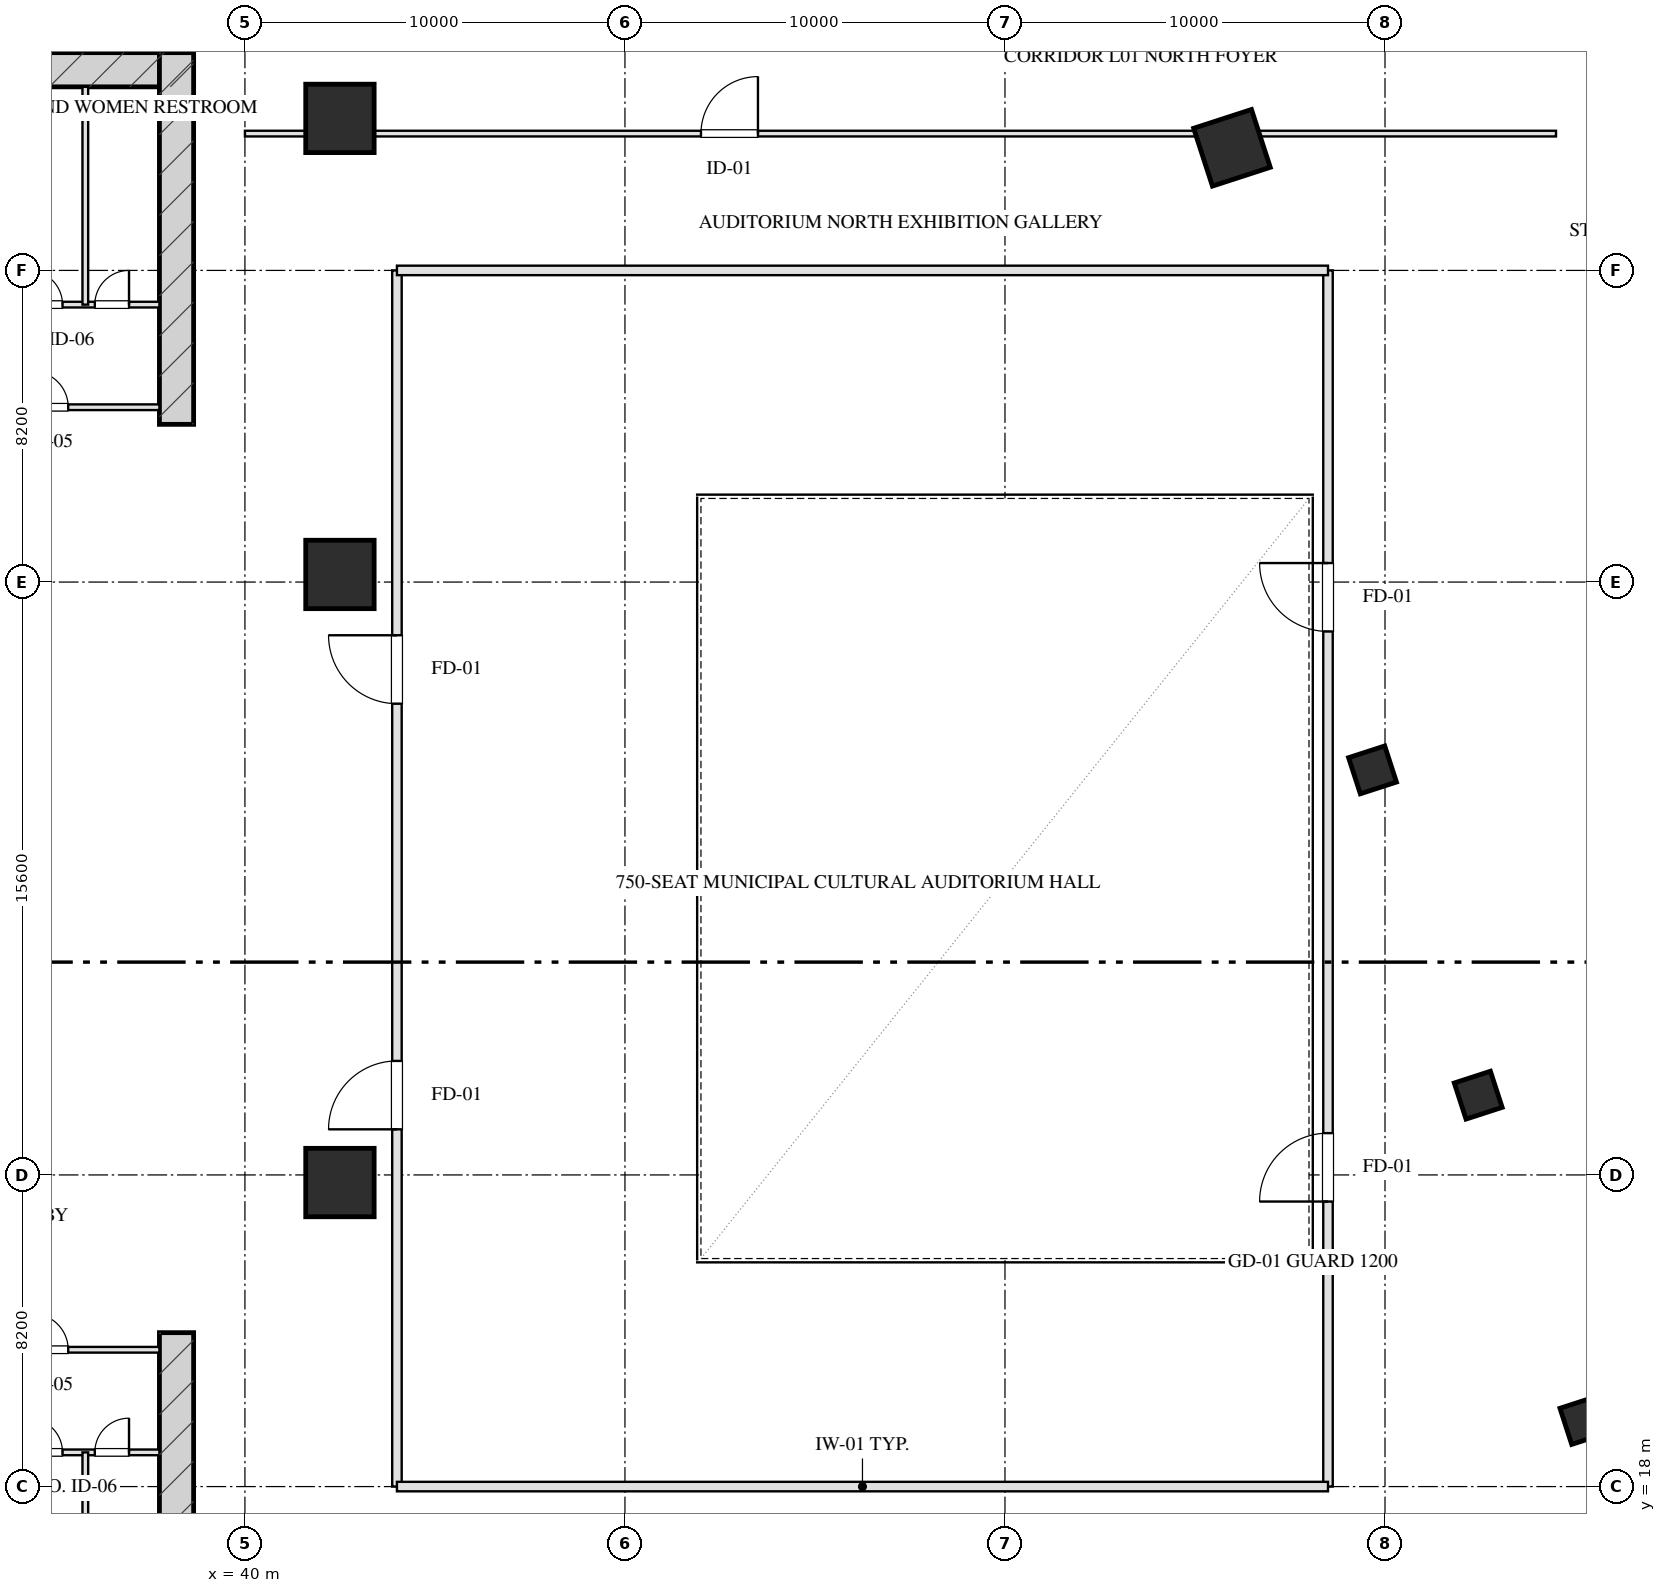
"""IFC4 building model, lengths in metres.
Left out: names, types, materials, properties, quantities, classifications, styles, units other than length and angle.
Written with IfcOpenShell. Run it as: python <this file> out.ifc"""

import sys

from ifc_helpers import new_model, si_unit, direction, frame, frame_2d, origin, origin_2d, place, context, subcontext, project, spatial, rectangle, hollow_rectangle, extrude, element, fill, save


model = new_model("IFC4")
c1 = context("Model", 3, precision=1e-05, world=origin(), true_north=direction((0.0, 1.0)))
c2 = subcontext(c1, "Body", "Model", "MODEL_VIEW")
j1 = project(units=[si_unit("LENGTHUNIT", "METRE"), si_unit("PLANEANGLEUNIT", "RADIAN")], contexts=[c1])
p1 = place(None, origin())
s1 = spatial("IfcSite", under=j1, at=p1, CompositionType="ELEMENT")
p2 = place(p1, origin())
s2 = spatial("IfcBuilding", under=s1, at=p2, CompositionType="ELEMENT")
p3 = place(p2, frame((0.0, 0.0, 6.0)))
s3 = spatial("IfcBuildingStorey", under=s2, at=p3, CompositionType="ELEMENT", Elevation=6.0)
p4 = place(p3, frame((38.2, 22.05, 0.0), z_axis=(0.0, 0.0, 1.0), x_axis=(0.0, -1.0, 0.0)))
e1 = element("IfcWall", 1, at=p4, inside=s3, PredefinedType="SHEAR", context=c2, shape_type="SweptSolid", body=[
    extrude(rectangle(XDim=9.78, YDim=0.9, at=frame_2d((4.89, 0.0))), origin(), (0.0, 0.0, 1.0), 5.5),
])
p5 = place(p3, frame((21.35, 55.28, 0.0), z_axis=(0.0, 0.0, 1.0), x_axis=(1.0, 0.0, 0.0)))
e2 = element("IfcWall", 2, at=p5, inside=s3, PredefinedType="SHEAR", context=c2, shape_type="SweptSolid", body=[
    extrude(rectangle(XDim=17.3, YDim=0.9, at=frame_2d((8.65, 0.0))), origin(), (0.0, 0.0, 1.0), 5.5),
])
p6 = place(p3, frame((38.2, 45.95, 0.0), z_axis=(0.0, 0.0, 1.0), x_axis=(0.0, 1.0, 0.0)))
e3 = element("IfcWall", 3, at=p6, inside=s3, PredefinedType="SHEAR", context=c2, shape_type="SweptSolid", body=[
    extrude(rectangle(XDim=9.78, YDim=0.9, at=frame_2d((4.89, 0.0))), origin(), (0.0, 0.0, 1.0), 5.5),
])
for number, where, z_axis, x_axis in (
    (4, (42.5, 26.0, 0.0), (0.0, 0.0, 1.0), (1.0, 0.0, 0.0)),
    (5, (42.5, 42.0, 0.0), (0.0, 0.0, 1.0), (1.0, 0.0, 0.0)),
    (6, (42.5, 54.0, 0.0), (0.0, 0.0, 1.0), (1.0, 0.0, 0.0)),
):
    element("IfcColumn", number, at=place(p3, frame(where, z_axis=z_axis, x_axis=x_axis)), inside=s3, PredefinedType="COLUMN", context=c2, shape_type="SweptSolid", body=[
        extrude(hollow_rectangle(XDim=1.8, YDim=1.8, WallThickness=0.06, at=origin_2d()), origin(), (0.0, 0.0, 1.0), 5.501),
    ])
p7 = place(p3, frame((65.973, 53.226, 0.0), z_axis=(0.0, 0.0, 1.0), x_axis=(0.951056516295, 0.309016994375, 0.0)))
e7 = element("IfcColumn", 7, at=p7, inside=s3, PredefinedType="COLUMN", context=c2, shape_type="SweptSolid", body=[
    extrude(hollow_rectangle(XDim=1.6, YDim=1.6, WallThickness=0.055, at=origin_2d()), origin(), (0.0, 0.0, 1.0), 5.501),
])
for number, where, z_axis, x_axis in (
    (8, (75.234, 19.739, 0.0), (0.0, 0.0, 1.0), (0.951, 0.309, 0.0)),
    (9, (72.453, 28.299, 0.0), (0.0, 0.0, 1.0), (0.951, 0.309, 0.0)),
    (10, (69.672, 36.858, 0.0), (0.0, 0.0, 1.0), (0.951, 0.309, 0.0)),
):
    element("IfcColumn", number, at=place(p3, frame(where, z_axis=z_axis, x_axis=x_axis)), inside=s3, PredefinedType="COLUMN", context=c2, shape_type="SweptSolid", body=[
        extrude(hollow_rectangle(XDim=1.0, YDim=1.0, WallThickness=0.036, at=origin_2d()), origin(), (0.0, 0.0, 1.0), 5.501),
    ])
p8 = place(p3, frame((33.95, 21.6, 0.0), z_axis=(0.0, 0.0, 1.0), x_axis=(1.0, 0.0, 0.0)))
e11 = element("IfcWall", 11, at=p8, inside=s3, PredefinedType="PARTITIONING", context=c2, shape_type="SweptSolid", body=[
    extrude(rectangle(XDim=3.8, YDim=0.15, at=frame_2d((1.9, 0.0))), origin(), (0.0, 0.0, 1.0), 5.185),
])
p9 = place(p8, frame((0.45, 0.0, 0.0)))
e12 = element("IfcOpeningElement", 12, at=p9, cuts=e11, PredefinedType="OPENING", context=c2, shape_type="SweptSolid", body=[
    extrude(rectangle(XDim=0.95, YDim=2.05, at=frame_2d((0.475, 1.025))), frame((0.0, 0.085, 0.0), z_axis=(0.0, -1.0, 0.0), x_axis=(1.0, 0.0, 0.0)), (0.0, 0.0, 1.0), 0.17),
])
p10 = place(p3, frame((33.95, 18.9, 0.0), z_axis=(0.0, 0.0, 1.0), x_axis=(1.0, 0.0, 0.0)))
e13 = element("IfcWall", 13, at=p10, inside=s3, PredefinedType="PARTITIONING", context=c2, shape_type="SweptSolid", body=[
    extrude(rectangle(XDim=3.8, YDim=0.15, at=frame_2d((1.9, 0.0))), origin(), (0.0, 0.0, 1.0), 5.185),
])
p11 = place(p10, frame((0.35, 0.0, 0.0)))
e14 = element("IfcOpeningElement", 14, at=p11, cuts=e13, PredefinedType="OPENING", context=c2, shape_type="SweptSolid", body=[
    extrude(rectangle(XDim=0.9, YDim=2.05, at=frame_2d((0.45, 1.025))), frame((0.0, 0.085, 0.0), z_axis=(0.0, -1.0, 0.0), x_axis=(1.0, 0.0, 0.0)), (0.0, 0.0, 1.0), 0.17),
])
p12 = place(p10, frame((2.1, 0.0, 0.0)))
e15 = element("IfcOpeningElement", 15, at=p12, cuts=e13, PredefinedType="OPENING", context=c2, shape_type="SweptSolid", body=[
    extrude(rectangle(XDim=0.9, YDim=2.05, at=frame_2d((0.45, 1.025))), frame((0.0, 0.085, 0.0), z_axis=(0.0, -1.0, 0.0), x_axis=(1.0, 0.0, 0.0)), (0.0, 0.0, 1.0), 0.17),
])
p13 = place(p3, frame((35.8, 18.9, 0.0), z_axis=(0.0, 0.0, 1.0), x_axis=(0.0, -1.0, 0.0)))
e16 = element("IfcWall", 16, at=p13, inside=s3, PredefinedType="PARTITIONING", context=c2, shape_type="SweptSolid", body=[
    extrude(rectangle(XDim=5.73, YDim=0.15, at=frame_2d((2.865, 0.0))), origin(), (0.0, 0.0, 1.0), 5.185),
])
p14 = place(p3, frame((33.95, 46.4, 0.0), z_axis=(0.0, 0.0, 1.0), x_axis=(1.0, 0.0, 0.0)))
e17 = element("IfcWall", 17, at=p14, inside=s3, PredefinedType="PARTITIONING", context=c2, shape_type="SweptSolid", body=[
    extrude(rectangle(XDim=3.8, YDim=0.15, at=frame_2d((1.9, 0.0))), origin(), (0.0, 0.0, 1.0), 5.185),
])
p15 = place(p14, frame((0.45, 0.0, 0.0)))
e18 = element("IfcOpeningElement", 18, at=p15, cuts=e17, PredefinedType="OPENING", context=c2, shape_type="SweptSolid", body=[
    extrude(rectangle(XDim=0.95, YDim=2.05, at=frame_2d((0.475, 1.025))), frame((0.0, 0.085, 0.0), z_axis=(0.0, -1.0, 0.0), x_axis=(1.0, 0.0, 0.0)), (0.0, 0.0, 1.0), 0.17),
])
p16 = place(p3, frame((33.95, 49.1, 0.0), z_axis=(0.0, 0.0, 1.0), x_axis=(1.0, 0.0, 0.0)))
e19 = element("IfcWall", 19, at=p16, inside=s3, PredefinedType="PARTITIONING", context=c2, shape_type="SweptSolid", body=[
    extrude(rectangle(XDim=3.8, YDim=0.15, at=frame_2d((1.9, 0.0))), origin(), (0.0, 0.0, 1.0), 5.185),
])
p17 = place(p16, frame((0.35, 0.0, 0.0)))
e20 = element("IfcOpeningElement", 20, at=p17, cuts=e19, PredefinedType="OPENING", context=c2, shape_type="SweptSolid", body=[
    extrude(rectangle(XDim=0.9, YDim=2.05, at=frame_2d((0.45, 1.025))), frame((0.0, 0.085, 0.0), z_axis=(0.0, -1.0, 0.0), x_axis=(1.0, 0.0, 0.0)), (0.0, 0.0, 1.0), 0.17),
])
p18 = place(p16, frame((2.1, 0.0, 0.0)))
e21 = element("IfcOpeningElement", 21, at=p18, cuts=e19, PredefinedType="OPENING", context=c2, shape_type="SweptSolid", body=[
    extrude(rectangle(XDim=0.9, YDim=2.05, at=frame_2d((0.45, 1.025))), frame((0.0, 0.085, 0.0), z_axis=(0.0, -1.0, 0.0), x_axis=(1.0, 0.0, 0.0)), (0.0, 0.0, 1.0), 0.17),
])
p19 = place(p3, frame((35.8, 49.1, 0.0), z_axis=(0.0, 0.0, 1.0), x_axis=(0.0, 1.0, 0.0)))
e22 = element("IfcWall", 22, at=p19, inside=s3, PredefinedType="PARTITIONING", context=c2, shape_type="SweptSolid", body=[
    extrude(rectangle(XDim=5.73, YDim=0.15, at=frame_2d((2.865, 0.0))), origin(), (0.0, 0.0, 1.0), 5.185),
])
p20 = place(p3, frame((44.0, 18.0, 0.0), z_axis=(0.0, 0.0, 1.0), x_axis=(0.0, 1.0, 0.0)))
e23 = element("IfcWall", 23, at=p20, inside=s3, PredefinedType="PARTITIONING", context=c2, shape_type="SweptSolid", body=[
    extrude(rectangle(XDim=32.0, YDim=0.25, at=frame_2d((16.0, 0.0))), origin(), (0.0, 0.0, 1.0), 5.185),
])
p21 = place(p20, frame((9.4, 0.0, 0.0)))
e24 = element("IfcOpeningElement", 24, at=p21, cuts=e23, PredefinedType="OPENING", context=c2, shape_type="SweptSolid", body=[
    extrude(rectangle(XDim=1.8, YDim=2.05, at=frame_2d((0.9, 1.025))), frame((0.0, 0.135, 0.0), z_axis=(0.0, -1.0, 0.0), x_axis=(1.0, 0.0, 0.0)), (0.0, 0.0, 1.0), 0.27),
])
p22 = place(p20, frame((20.6, 0.0, 0.0)))
e25 = element("IfcOpeningElement", 25, at=p22, cuts=e23, PredefinedType="OPENING", context=c2, shape_type="SweptSolid", body=[
    extrude(rectangle(XDim=1.8, YDim=2.05, at=frame_2d((0.9, 1.025))), frame((0.0, 0.135, 0.0), z_axis=(0.0, -1.0, 0.0), x_axis=(1.0, 0.0, 0.0)), (0.0, 0.0, 1.0), 0.27),
])
p23 = place(p3, frame((68.5, 18.0, 0.0), z_axis=(0.0, 0.0, 1.0), x_axis=(0.0, 1.0, 0.0)))
e26 = element("IfcWall", 26, at=p23, inside=s3, PredefinedType="PARTITIONING", context=c2, shape_type="SweptSolid", body=[
    extrude(rectangle(XDim=32.0, YDim=0.25, at=frame_2d((16.0, 0.0))), origin(), (0.0, 0.0, 1.0), 5.185),
])
p24 = place(p23, frame((7.5, 0.0, 0.0)))
e27 = element("IfcOpeningElement", 27, at=p24, cuts=e26, PredefinedType="OPENING", context=c2, shape_type="SweptSolid", body=[
    extrude(rectangle(XDim=1.8, YDim=2.05, at=frame_2d((0.9, 1.025))), frame((0.0, 0.135, 0.0), z_axis=(0.0, -1.0, 0.0), x_axis=(1.0, 0.0, 0.0)), (0.0, 0.0, 1.0), 0.27),
])
p25 = place(p23, frame((22.5, 0.0, 0.0)))
e28 = element("IfcOpeningElement", 28, at=p25, cuts=e26, PredefinedType="OPENING", context=c2, shape_type="SweptSolid", body=[
    extrude(rectangle(XDim=1.8, YDim=2.05, at=frame_2d((0.9, 1.025))), frame((0.0, 0.135, 0.0), z_axis=(0.0, -1.0, 0.0), x_axis=(1.0, 0.0, 0.0)), (0.0, 0.0, 1.0), 0.27),
])
for number, where, z_axis, x_axis in (
    (29, (44.0, 18.0, 0.0), (0.0, 0.0, 1.0), (1.0, 0.0, 0.0)),
    (30, (44.0, 50.0, 0.0), (0.0, 0.0, 1.0), (1.0, 0.0, 0.0)),
):
    element("IfcWall", number, at=place(p3, frame(where, z_axis=z_axis, x_axis=x_axis)), inside=s3, PredefinedType="PARTITIONING", context=c2, shape_type="SweptSolid", body=[
        extrude(rectangle(XDim=24.5, YDim=0.25, at=frame_2d((12.25, 0.0))), origin(), (0.0, 0.0, 1.0), 5.185),
    ])
p26 = place(p3, frame((40.0, 53.6, 0.0), z_axis=(0.0, 0.0, 1.0), x_axis=(1.0, 0.0, 0.0)))
e31 = element("IfcWall", 31, at=p26, inside=s3, PredefinedType="PARTITIONING", context=c2, shape_type="SweptSolid", body=[
    extrude(rectangle(XDim=34.5, YDim=0.15, at=frame_2d((17.25, 0.0))), origin(), (0.0, 0.0, 1.0), 5.185),
])
p27 = place(p26, frame((12.0, 0.0, 0.0)))
e32 = element("IfcOpeningElement", 32, at=p27, cuts=e31, PredefinedType="OPENING", context=c2, shape_type="SweptSolid", body=[
    extrude(rectangle(XDim=1.5, YDim=2.05, at=frame_2d((0.75, 1.025))), frame((0.0, 0.085, 0.0), z_axis=(0.0, -1.0, 0.0), x_axis=(1.0, 0.0, 0.0)), (0.0, 0.0, 1.0), 0.17),
])
p28 = place(p9, origin())
e33 = element("IfcDoor", 33, at=p28, inside=s3, OperationType="SINGLE_SWING_LEFT", PredefinedType="DOOR", context=c2, shape_type="SweptSolid", body=[
    extrude(rectangle(XDim=0.95, YDim=2.05, at=frame_2d((0.475, 1.025))), frame((0.0, 0.025, 0.0), z_axis=(0.0, -1.0, 0.0), x_axis=(1.0, 0.0, 0.0)), (0.0, 0.0, 1.0), 0.05),
])
fill(e12, e33)
p29 = place(p11, origin())
e34 = element("IfcDoor", 34, at=p29, inside=s3, OperationType="SINGLE_SWING_LEFT", PredefinedType="DOOR", context=c2, shape_type="SweptSolid", body=[
    extrude(rectangle(XDim=0.9, YDim=2.05, at=frame_2d((0.45, 1.025))), frame((0.0, 0.025, 0.0), z_axis=(0.0, -1.0, 0.0), x_axis=(1.0, 0.0, 0.0)), (0.0, 0.0, 1.0), 0.05),
])
fill(e14, e34)
p30 = place(p12, origin())
e35 = element("IfcDoor", 35, at=p30, inside=s3, OperationType="SINGLE_SWING_RIGHT", PredefinedType="DOOR", context=c2, shape_type="SweptSolid", body=[
    extrude(rectangle(XDim=0.9, YDim=2.05, at=frame_2d((0.45, 1.025))), frame((0.0, 0.025, 0.0), z_axis=(0.0, -1.0, 0.0), x_axis=(1.0, 0.0, 0.0)), (0.0, 0.0, 1.0), 0.05),
])
fill(e15, e35)
p31 = place(p15, origin())
e36 = element("IfcDoor", 36, at=p31, inside=s3, OperationType="SINGLE_SWING_LEFT", PredefinedType="DOOR", context=c2, shape_type="SweptSolid", body=[
    extrude(rectangle(XDim=0.95, YDim=2.05, at=frame_2d((0.475, 1.025))), frame((0.0, 0.025, 0.0), z_axis=(0.0, -1.0, 0.0), x_axis=(1.0, 0.0, 0.0)), (0.0, 0.0, 1.0), 0.05),
])
fill(e18, e36)
p32 = place(p17, origin())
e37 = element("IfcDoor", 37, at=p32, inside=s3, OperationType="SINGLE_SWING_LEFT", PredefinedType="DOOR", context=c2, shape_type="SweptSolid", body=[
    extrude(rectangle(XDim=0.9, YDim=2.05, at=frame_2d((0.45, 1.025))), frame((0.0, 0.025, 0.0), z_axis=(0.0, -1.0, 0.0), x_axis=(1.0, 0.0, 0.0)), (0.0, 0.0, 1.0), 0.05),
])
fill(e20, e37)
p33 = place(p18, origin())
e38 = element("IfcDoor", 38, at=p33, inside=s3, OperationType="SINGLE_SWING_RIGHT", PredefinedType="DOOR", context=c2, shape_type="SweptSolid", body=[
    extrude(rectangle(XDim=0.9, YDim=2.05, at=frame_2d((0.45, 1.025))), frame((0.0, 0.025, 0.0), z_axis=(0.0, -1.0, 0.0), x_axis=(1.0, 0.0, 0.0)), (0.0, 0.0, 1.0), 0.05),
])
fill(e21, e38)
p34 = place(p21, origin())
e39 = element("IfcDoor", 39, at=p34, inside=s3, OperationType="SINGLE_SWING_LEFT", PredefinedType="DOOR", context=c2, shape_type="SweptSolid", body=[
    extrude(rectangle(XDim=1.8, YDim=2.05, at=frame_2d((0.9, 1.025))), frame((0.0, 0.025, 0.0), z_axis=(0.0, -1.0, 0.0), x_axis=(1.0, 0.0, 0.0)), (0.0, 0.0, 1.0), 0.05),
])
fill(e24, e39)
p35 = place(p22, origin())
e40 = element("IfcDoor", 40, at=p35, inside=s3, OperationType="SINGLE_SWING_RIGHT", PredefinedType="DOOR", context=c2, shape_type="SweptSolid", body=[
    extrude(rectangle(XDim=1.8, YDim=2.05, at=frame_2d((0.9, 1.025))), frame((0.0, 0.025, 0.0), z_axis=(0.0, -1.0, 0.0), x_axis=(1.0, 0.0, 0.0)), (0.0, 0.0, 1.0), 0.05),
])
fill(e25, e40)
p36 = place(p24, origin())
e41 = element("IfcDoor", 41, at=p36, inside=s3, OperationType="SINGLE_SWING_LEFT", PredefinedType="DOOR", context=c2, shape_type="SweptSolid", body=[
    extrude(rectangle(XDim=1.8, YDim=2.05, at=frame_2d((0.9, 1.025))), frame((0.0, 0.025, 0.0), z_axis=(0.0, -1.0, 0.0), x_axis=(1.0, 0.0, 0.0)), (0.0, 0.0, 1.0), 0.05),
])
fill(e27, e41)
p37 = place(p25, origin())
e42 = element("IfcDoor", 42, at=p37, inside=s3, OperationType="SINGLE_SWING_RIGHT", PredefinedType="DOOR", context=c2, shape_type="SweptSolid", body=[
    extrude(rectangle(XDim=1.8, YDim=2.05, at=frame_2d((0.9, 1.025))), frame((0.0, 0.025, 0.0), z_axis=(0.0, -1.0, 0.0), x_axis=(1.0, 0.0, 0.0)), (0.0, 0.0, 1.0), 0.05),
])
fill(e28, e42)
p38 = place(p27, origin())
e43 = element("IfcDoor", 43, at=p38, inside=s3, OperationType="SINGLE_SWING_RIGHT", PredefinedType="DOOR", context=c2, shape_type="SweptSolid", body=[
    extrude(rectangle(XDim=1.5, YDim=2.05, at=frame_2d((0.75, 1.025))), frame((0.0, 0.025, 0.0), z_axis=(0.0, -1.0, 0.0), x_axis=(1.0, 0.0, 0.0)), (0.0, 0.0, 1.0), 0.05),
])
fill(e32, e43)
save(model, sys.argv[1])
